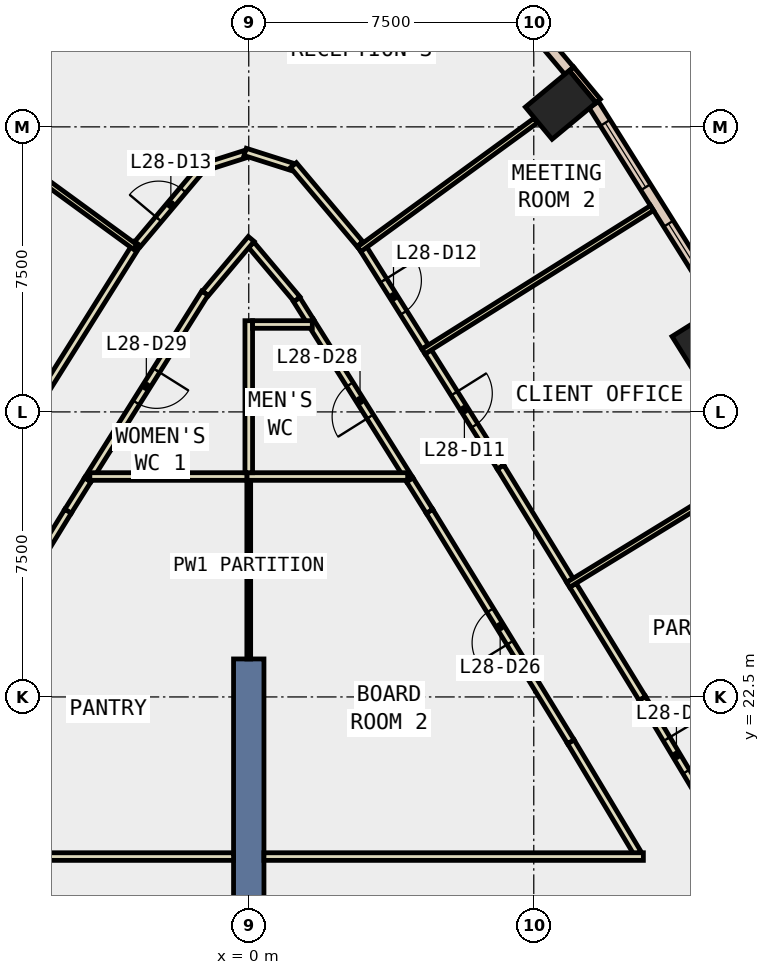
"""IFC4 building model, lengths in metres.
Left out: names, types, materials, properties, quantities, classifications, styles, units other than length and angle.
Written with IfcOpenShell. Run it as: python <this file> out.ifc"""

import sys

from ifc_helpers import new_model, si_unit, direction, frame, frame_2d, origin, origin_2d, place, context, subcontext, project, spatial, rectangle, extrude, element, fill, save


model = new_model("IFC4")
c1 = context("Model", 3, precision=1e-05, world=origin(), true_north=direction((0.0, 1.0)))
c2 = subcontext(c1, "Body", "Model", "MODEL_VIEW")
j1 = project(units=[si_unit("LENGTHUNIT", "METRE"), si_unit("PLANEANGLEUNIT", "RADIAN")], contexts=[c1])
p1 = place(None, origin())
s1 = spatial("IfcSite", under=j1, at=p1, CompositionType="ELEMENT")
p2 = place(p1, origin())
s2 = spatial("IfcBuilding", under=s1, at=p2, CompositionType="ELEMENT")
p3 = place(p2, frame((0.0, 0.0, 128.6)))
s3 = spatial("IfcBuildingStorey", under=s2, at=p3, CompositionType="ELEMENT", Elevation=128.6)
for number, where, z_axis, x_axis in (
    (1, (12.066, 31.917, -0.4), (0.0, 0.0, 1.0), (-0.53, 0.848, 0.0)),
    (2, (8.208, 38.077, -0.4), (0.0, 0.0, 1.0), (-0.638, 0.77, 0.0)),
):
    element("IfcColumn", number, at=place(p3, frame(where, z_axis=z_axis, x_axis=x_axis)), inside=s3, PredefinedType="COLUMN", context=c2, shape_type="SweptSolid", body=[
        extrude(rectangle(XDim=1.1, YDim=1.5, at=origin_2d()), origin(), (0.0, 0.0, 1.0), 4.0),
    ])
p4 = place(p3, frame((0.0, 14.5, -0.4), z_axis=(0.0, 0.0, 1.0), x_axis=(0.0, 1.0, 0.0)))
e3 = element("IfcWall", 3, at=p4, inside=s3, PredefinedType="SHEAR", context=c2, shape_type="SweptSolid", body=[
    extrude(rectangle(XDim=9.0, YDim=0.8, at=frame_2d((4.5, 0.0))), origin(), (0.0, 0.0, 1.0), 4.0),
])
p5 = place(p3, frame((9.194, 38.181, 0.0), z_axis=(0.0, 0.0, 1.0), x_axis=(-0.638566874111, 0.769566337159, 0.0)))
e4 = element("IfcWall", 4, at=p5, inside=s3, PredefinedType="STANDARD", context=c2, shape_type="SweptSolid", body=[
    extrude(rectangle(XDim=1.1, YDim=0.15, at=frame_2d((0.55, 0.0))), origin(), (0.0, 0.0, 1.0), 3.6),
])
p6 = place(p3, frame((12.41, 32.779, 0.0), z_axis=(0.0, 0.0, 1.0), x_axis=(-0.53160564075, 0.846991996847, 0.0)))
e5 = element("IfcWall", 5, at=p6, inside=s3, PredefinedType="STANDARD", context=c2, shape_type="SweptSolid", body=[
    extrude(rectangle(XDim=6.266, YDim=0.3, at=frame_2d((3.133, 0.0))), origin(), (0.0, 0.0, 1.0), 3.6),
])
p7 = place(p6, frame((0.566, 0.0, 0.9)))
e6 = element("IfcOpeningElement", 6, at=p7, cuts=e5, PredefinedType="OPENING", context=c2, shape_type="SweptSolid", body=[
    extrude(rectangle(XDim=2.0, YDim=2.6, at=frame_2d((1.0, 1.3))), frame((0.0, 0.16, 0.0), z_axis=(0.0, -1.0, 0.0), x_axis=(1.0, 0.0, 0.0)), (0.0, 0.0, 1.0), 0.32),
])
p8 = place(p6, frame((3.699, 0.0, 0.9)))
e7 = element("IfcOpeningElement", 7, at=p8, cuts=e5, PredefinedType="OPENING", context=c2, shape_type="SweptSolid", body=[
    extrude(rectangle(XDim=2.0, YDim=2.6, at=frame_2d((1.0, 1.3))), frame((0.0, 0.16, 0.0), z_axis=(0.0, -1.0, 0.0), x_axis=(1.0, 0.0, 0.0)), (0.0, 0.0, 1.0), 0.32),
])
p9 = place(p3, frame((8.432, 38.976, 0.0), z_axis=(0.0, 0.0, 1.0), x_axis=(-0.643948600943, 0.765068754652, 0.0)))
e8 = element("IfcWall", 8, at=p9, inside=s3, PredefinedType="STANDARD", context=c2, shape_type="SweptSolid", body=[
    extrude(rectangle(XDim=4.138, YDim=0.3, at=frame_2d((2.069, 0.0))), origin(), (0.0, 0.0, 1.0), 3.6),
])
p10 = place(p9, frame((1.369, 0.0, 0.9)))
e9 = element("IfcOpeningElement", 9, at=p10, cuts=e8, PredefinedType="OPENING", context=c2, shape_type="SweptSolid", body=[
    extrude(rectangle(XDim=1.4, YDim=2.6, at=frame_2d((0.7, 1.3))), frame((0.0, 0.16, 0.0), z_axis=(0.0, -1.0, 0.0), x_axis=(1.0, 0.0, 0.0)), (0.0, 0.0, 1.0), 0.32),
])
p11 = place(p3, frame((10.232, 18.386, 0.0), z_axis=(0.0, 0.0, 1.0), x_axis=(-0.513592824646, 0.858034038062, 0.0)))
e10 = element("IfcWall", 10, at=p11, inside=s3, PredefinedType="PARTITIONING", context=c2, shape_type="SweptSolid", body=[
    extrude(rectangle(XDim=3.421, YDim=0.2, at=frame_2d((1.71, 0.0))), origin(), (0.0, 0.0, 1.0), 3.6),
])
p12 = place(p3, frame((8.475, 21.321, 0.0), z_axis=(0.0, 0.0, 1.0), x_axis=(-0.522743103274, 0.852490262689, 0.0)))
e11 = element("IfcWall", 11, at=p12, inside=s3, PredefinedType="PARTITIONING", context=c2, shape_type="SweptSolid", body=[
    extrude(rectangle(XDim=7.115, YDim=0.2, at=frame_2d((3.557, 0.0))), origin(), (0.0, 0.0, 1.0), 3.6),
])
p13 = place(p12, frame((3.057, 0.0, 0.0)))
e12 = element("IfcOpeningElement", 12, at=p13, cuts=e11, PredefinedType="OPENING", context=c2, shape_type="SweptSolid", body=[
    extrude(rectangle(XDim=1.0, YDim=2.1, at=frame_2d((0.5, 1.05))), frame((0.0, 0.11, 0.0), z_axis=(0.0, -1.0, 0.0), x_axis=(1.0, 0.0, 0.0)), (0.0, 0.0, 1.0), 0.22),
])
for number, where, z_axis, x_axis in (
    (13, (4.756, 27.386, 0.0), (0.0, 0.0, 1.0), (-0.531, 0.847, 0.0)),
    (14, (-4.236, 28.215, 0.0), (0.0, 0.0, 1.0), (-0.531, -0.847, 0.0)),
):
    element("IfcWall", number, at=place(p3, frame(where, z_axis=z_axis, x_axis=x_axis)), inside=s3, PredefinedType="PARTITIONING", context=c2, shape_type="SweptSolid", body=[
        extrude(rectangle(XDim=0.979, YDim=0.2, at=frame_2d((0.489, 0.0))), origin(), (0.0, 0.0, 1.0), 3.6),
    ])
p14 = place(p3, frame((-4.756, 27.386, 0.0), z_axis=(0.0, 0.0, 1.0), x_axis=(-0.522743103274, -0.852490262689, 0.0)))
e15 = element("IfcWall", 15, at=p14, inside=s3, PredefinedType="PARTITIONING", context=c2, shape_type="SweptSolid", body=[
    extrude(rectangle(XDim=7.115, YDim=0.2, at=frame_2d((3.557, 0.0))), origin(), (0.0, 0.0, 1.0), 3.6),
])
p15 = place(p14, frame((3.057, 0.0, 0.0)))
e16 = element("IfcOpeningElement", 16, at=p15, cuts=e15, PredefinedType="OPENING", context=c2, shape_type="SweptSolid", body=[
    extrude(rectangle(XDim=1.0, YDim=2.1, at=frame_2d((0.5, 1.05))), frame((0.0, 0.11, 0.0), z_axis=(0.0, -1.0, 0.0), x_axis=(1.0, 0.0, 0.0)), (0.0, 0.0, 1.0), 0.22),
])
p16 = place(p3, frame((4.236, 28.215, 0.0), z_axis=(0.0, 0.0, 1.0), x_axis=(-0.531602694807, 0.84699384583, 0.0)))
e17 = element("IfcWall", 17, at=p16, inside=s3, PredefinedType="PARTITIONING", context=c2, shape_type="SweptSolid", body=[
    extrude(rectangle(XDim=4.923, YDim=0.2, at=frame_2d((2.461, 0.0))), origin(), (0.0, 0.0, 1.0), 3.6),
])
p17 = place(p16, frame((1.961, 0.0, 0.0)))
e18 = element("IfcOpeningElement", 18, at=p17, cuts=e17, PredefinedType="OPENING", context=c2, shape_type="SweptSolid", body=[
    extrude(rectangle(XDim=1.0, YDim=2.1, at=frame_2d((0.5, 1.05))), frame((0.0, 0.11, 0.0), z_axis=(0.0, -1.0, 0.0), x_axis=(1.0, 0.0, 0.0)), (0.0, 0.0, 1.0), 0.22),
])
p18 = place(p3, frame((1.619, 32.385, 0.0), z_axis=(0.0, 0.0, 1.0), x_axis=(-0.532112237469, 0.84667382547, 0.0)))
e19 = element("IfcWall", 19, at=p18, inside=s3, PredefinedType="PARTITIONING", context=c2, shape_type="SweptSolid", body=[
    extrude(rectangle(XDim=0.675, YDim=0.2, at=frame_2d((0.337, 0.0))), origin(), (0.0, 0.0, 1.0), 3.6),
])
p19 = place(p3, frame((1.271, 32.964, 0.0), z_axis=(0.0, 0.0, 1.0), x_axis=(-0.644007376392, 0.765019280249, 0.0)))
e20 = element("IfcWall", 20, at=p19, inside=s3, PredefinedType="PARTITIONING", context=c2, shape_type="SweptSolid", body=[
    extrude(rectangle(XDim=1.874, YDim=0.2, at=frame_2d((0.937, 0.0))), origin(), (0.0, 0.0, 1.0), 3.6),
])
p20 = place(p3, frame((0.064, 34.551, 0.0), z_axis=(0.0, 0.0, 1.0), x_axis=(-0.643638095982, -0.765329995101, 0.0)))
e21 = element("IfcWall", 21, at=p20, inside=s3, PredefinedType="PARTITIONING", context=c2, shape_type="SweptSolid", body=[
    extrude(rectangle(XDim=1.874, YDim=0.2, at=frame_2d((0.937, 0.0))), origin(), (0.0, 0.0, 1.0), 3.6),
])
p21 = place(p3, frame((-1.154, 33.125, 0.0), z_axis=(0.0, 0.0, 1.0), x_axis=(-0.531652223099, -0.846962758139, 0.0)))
e22 = element("IfcWall", 22, at=p21, inside=s3, PredefinedType="PARTITIONING", context=c2, shape_type="SweptSolid", body=[
    extrude(rectangle(XDim=5.797, YDim=0.2, at=frame_2d((2.898, 0.0))), origin(), (0.0, 0.0, 1.0), 3.6),
])
p22 = place(p21, frame((2.399, 0.0, 0.0)))
e23 = element("IfcOpeningElement", 23, at=p22, cuts=e22, PredefinedType="OPENING", context=c2, shape_type="SweptSolid", body=[
    extrude(rectangle(XDim=1.0, YDim=2.1, at=frame_2d((0.5, 1.05))), frame((0.0, 0.11, 0.0), z_axis=(0.0, -1.0, 0.0), x_axis=(1.0, 0.0, 0.0)), (0.0, 0.0, 1.0), 0.22),
])
p23 = place(p3, frame((8.531, 25.439, 0.0), z_axis=(0.0, 0.0, 1.0), x_axis=(0.522704631836, -0.852513852003, 0.0)))
e24 = element("IfcWall", 24, at=p23, inside=s3, PredefinedType="PARTITIONING", context=c2, shape_type="SweptSolid", body=[
    extrude(rectangle(XDim=3.493, YDim=0.2, at=frame_2d((1.747, 0.0))), origin(), (0.0, 0.0, 1.0), 3.6),
])
p24 = place(p3, frame((10.357, 22.461, 0.0), z_axis=(0.0, 0.0, 1.0), x_axis=(0.513467759888, -0.858108885606, 0.0)))
e25 = element("IfcWall", 25, at=p24, inside=s3, PredefinedType="PARTITIONING", context=c2, shape_type="SweptSolid", body=[
    extrude(rectangle(XDim=3.494, YDim=0.2, at=frame_2d((1.747, 0.0))), origin(), (0.0, 0.0, 1.0), 3.6),
])
p25 = place(p24, frame((1.247, 0.0, 0.0)))
e26 = element("IfcOpeningElement", 26, at=p25, cuts=e25, PredefinedType="OPENING", context=c2, shape_type="SweptSolid", body=[
    extrude(rectangle(XDim=1.0, YDim=2.1, at=frame_2d((0.5, 1.05))), frame((0.0, 0.11, 0.0), z_axis=(0.0, -1.0, 0.0), x_axis=(1.0, 0.0, 0.0)), (0.0, 0.0, 1.0), 0.22),
])
p26 = place(p3, frame((4.722, 31.579, 0.0), z_axis=(0.0, 0.0, 1.0), x_axis=(0.531664655861, -0.846954953766, 0.0)))
e27 = element("IfcWall", 27, at=p26, inside=s3, PredefinedType="PARTITIONING", context=c2, shape_type="SweptSolid", body=[
    extrude(rectangle(XDim=3.581, YDim=0.2, at=frame_2d((1.791, 0.0))), origin(), (0.0, 0.0, 1.0), 3.6),
])
p27 = place(p26, frame((1.291, 0.0, 0.0)))
e28 = element("IfcOpeningElement", 28, at=p27, cuts=e27, PredefinedType="OPENING", context=c2, shape_type="SweptSolid", body=[
    extrude(rectangle(XDim=1.0, YDim=2.1, at=frame_2d((0.5, 1.05))), frame((0.0, 0.11, 0.0), z_axis=(0.0, -1.0, 0.0), x_axis=(1.0, 0.0, 0.0)), (0.0, 0.0, 1.0), 0.22),
])
p28 = place(p3, frame((6.626, 28.546, 0.0), z_axis=(0.0, 0.0, 1.0), x_axis=(0.522580081027, -0.852590205734, 0.0)))
e29 = element("IfcWall", 29, at=p28, inside=s3, PredefinedType="PARTITIONING", context=c2, shape_type="SweptSolid", body=[
    extrude(rectangle(XDim=3.494, YDim=0.2, at=frame_2d((1.747, 0.0))), origin(), (0.0, 0.0, 1.0), 3.6),
])
p29 = place(p3, frame((2.975, 34.361, 0.0), z_axis=(0.0, 0.0, 1.0), x_axis=(0.531740854333, -0.846907116414, 0.0)))
e30 = element("IfcWall", 30, at=p29, inside=s3, PredefinedType="PARTITIONING", context=c2, shape_type="SweptSolid", body=[
    extrude(rectangle(XDim=3.135, YDim=0.2, at=frame_2d((1.567, 0.0))), origin(), (0.0, 0.0, 1.0), 3.6),
])
p30 = place(p29, frame((1.068, 0.0, 0.0)))
e31 = element("IfcOpeningElement", 31, at=p30, cuts=e30, PredefinedType="OPENING", context=c2, shape_type="SweptSolid", body=[
    extrude(rectangle(XDim=1.0, YDim=2.1, at=frame_2d((0.5, 1.05))), frame((0.0, 0.11, 0.0), z_axis=(0.0, -1.0, 0.0), x_axis=(1.0, 0.0, 0.0)), (0.0, 0.0, 1.0), 0.22),
])
p31 = place(p3, frame((-2.924, 34.417, 0.0), z_axis=(0.0, 0.0, 1.0), x_axis=(0.644113583568, 0.764929860486, 0.0)))
e32 = element("IfcWall", 32, at=p31, inside=s3, PredefinedType="PARTITIONING", context=c2, shape_type="SweptSolid", body=[
    extrude(rectangle(XDim=2.714, YDim=0.2, at=frame_2d((1.357, 0.0))), origin(), (0.0, 0.0, 1.0), 3.6),
])
p32 = place(p31, frame((0.857, 0.0, 0.0)))
e33 = element("IfcOpeningElement", 33, at=p32, cuts=e32, PredefinedType="OPENING", context=c2, shape_type="SweptSolid", body=[
    extrude(rectangle(XDim=1.0, YDim=2.1, at=frame_2d((0.5, 1.05))), frame((0.0, 0.11, 0.0), z_axis=(0.0, -1.0, 0.0), x_axis=(1.0, 0.0, 0.0)), (0.0, 0.0, 1.0), 0.22),
])
p33 = place(p3, frame((-1.145, 36.447, 0.0), z_axis=(0.0, 0.0, 1.0), x_axis=(0.952957783381, 0.303103056886, 0.0)))
e34 = element("IfcWall", 34, at=p33, inside=s3, PredefinedType="PARTITIONING", context=c2, shape_type="SweptSolid", body=[
    extrude(rectangle(XDim=1.102, YDim=0.2, at=frame_2d((0.551, 0.0))), origin(), (0.0, 0.0, 1.0), 3.6),
])
p34 = place(p3, frame((-0.095, 36.841, 0.0), z_axis=(0.0, 0.0, 1.0), x_axis=(0.953036611979, -0.302855107646, 0.0)))
e35 = element("IfcWall", 35, at=p34, inside=s3, PredefinedType="PARTITIONING", context=c2, shape_type="SweptSolid", body=[
    extrude(rectangle(XDim=1.301, YDim=0.2, at=frame_2d((0.65, 0.0))), origin(), (0.0, 0.0, 1.0), 3.6),
])
p35 = place(p3, frame((1.176, 36.493, 0.0), z_axis=(0.0, 0.0, 1.0), x_axis=(0.644113583568, -0.764929860486, 0.0)))
e36 = element("IfcWall", 36, at=p35, inside=s3, PredefinedType="PARTITIONING", context=c2, shape_type="SweptSolid", body=[
    extrude(rectangle(XDim=2.714, YDim=0.2, at=frame_2d((1.357, 0.0))), origin(), (0.0, 0.0, 1.0), 3.6),
])
p36 = place(p3, frame((-6.626, 28.546, 0.0), z_axis=(0.0, 0.0, 1.0), x_axis=(0.531701842465, 0.846931609234, 0.0)))
e37 = element("IfcWall", 37, at=p36, inside=s3, PredefinedType="PARTITIONING", context=c2, shape_type="SweptSolid", body=[
    extrude(rectangle(XDim=6.942, YDim=0.2, at=frame_2d((3.471, 0.0))), origin(), (0.0, 0.0, 1.0), 3.6),
])
for number, where, z_axis, x_axis in (
    (38, (0.4, 18.3, 0.0), (0.0, 0.0, 1.0), (1.0, 0.0, 0.0)),
    (39, (-10.384, 18.3, 0.0), (0.0, 0.0, 1.0), (1.0, 0.0, 0.0)),
):
    element("IfcWall", number, at=place(p3, frame(where, z_axis=z_axis, x_axis=x_axis)), inside=s3, PredefinedType="PARTITIONING", context=c2, shape_type="SweptSolid", body=[
        extrude(rectangle(XDim=9.984, YDim=0.2, at=frame_2d((4.992, 0.0))), origin(), (0.0, 0.0, 1.0), 3.6),
    ])
p37 = place(p3, frame((0.0, 23.5, 0.0), z_axis=(0.0, 0.0, 1.0), x_axis=(0.0, 1.0, 0.0)))
e40 = element("IfcWall", 40, at=p37, inside=s3, PredefinedType="PARTITIONING", context=c2, shape_type="SweptSolid", body=[
    extrude(rectangle(XDim=4.9, YDim=0.1, at=frame_2d((2.45, 0.0))), origin(), (0.0, 0.0, 1.0), 3.6),
])
p38 = place(p3, frame((-0.05, 28.3, 0.0), z_axis=(0.0, 0.0, 1.0), x_axis=(1.0, 0.0, 0.0)))
e41 = element("IfcWall", 41, at=p38, inside=s3, PredefinedType="PARTITIONING", context=c2, shape_type="SweptSolid", body=[
    extrude(rectangle(XDim=4.232, YDim=0.2, at=frame_2d((2.116, 0.0))), origin(), (0.0, 0.0, 1.0), 3.6),
])
p39 = place(p3, frame((-4.182, 28.3, 0.0), z_axis=(0.0, 0.0, 1.0), x_axis=(1.0, 0.0, 0.0)))
e42 = element("IfcWall", 42, at=p39, inside=s3, PredefinedType="PARTITIONING", context=c2, shape_type="SweptSolid", body=[
    extrude(rectangle(XDim=4.132, YDim=0.2, at=frame_2d((2.066, 0.0))), origin(), (0.0, 0.0, 1.0), 3.6),
])
p40 = place(p3, frame((0.0, 28.4, 0.0), z_axis=(0.0, 0.0, 1.0), x_axis=(0.0, 1.0, 0.0)))
e43 = element("IfcWall", 43, at=p40, inside=s3, PredefinedType="PARTITIONING", context=c2, shape_type="SweptSolid", body=[
    extrude(rectangle(XDim=4.0, YDim=0.2, at=frame_2d((2.0, 0.0))), origin(), (0.0, 0.0, 1.0), 3.6),
])
p41 = place(p3, frame((0.1, 32.3, 0.0), z_axis=(0.0, 0.0, 1.0), x_axis=(1.0, 0.0, 0.0)))
e44 = element("IfcWall", 44, at=p41, inside=s3, PredefinedType="PARTITIONING", context=c2, shape_type="SweptSolid", body=[
    extrude(rectangle(XDim=1.572, YDim=0.2, at=frame_2d((0.786, 0.0))), origin(), (0.0, 0.0, 1.0), 3.6),
])
p42 = place(p3, frame((8.406, 25.451, 0.0), z_axis=(0.0, 0.0, 1.0), x_axis=(0.852520194289, 0.522694287637, 0.0)))
e45 = element("IfcWall", 45, at=p42, inside=s3, PredefinedType="PARTITIONING", context=c2, shape_type="SweptSolid", body=[
    extrude(rectangle(XDim=7.1, YDim=0.15, at=frame_2d((3.55, 0.0))), origin(), (0.0, 0.0, 1.0), 3.6),
])
p43 = place(p3, frame((4.597, 31.589, 0.0), z_axis=(0.0, 0.0, 1.0), x_axis=(0.846980720953, 0.531623605885, 0.0)))
e46 = element("IfcWall", 46, at=p43, inside=s3, PredefinedType="PARTITIONING", context=c2, shape_type="SweptSolid", body=[
    extrude(rectangle(XDim=7.101, YDim=0.15, at=frame_2d((3.55, 0.0))), origin(), (0.0, 0.0, 1.0), 3.6),
])
p44 = place(p3, frame((2.908, 34.281, 0.0), z_axis=(0.0, 0.0, 1.0), x_axis=(0.807935867, 0.589270425879, 0.0)))
e47 = element("IfcWall", 47, at=p44, inside=s3, PredefinedType="PARTITIONING", context=c2, shape_type="SweptSolid", body=[
    extrude(rectangle(XDim=5.744, YDim=0.15, at=frame_2d((2.872, 0.0))), origin(), (0.0, 0.0, 1.0), 3.6),
])
p45 = place(p3, frame((-2.989, 34.34, 0.0), z_axis=(0.0, 0.0, 1.0), x_axis=(-0.807932877043, 0.589274525322, 0.0)))
e48 = element("IfcWall", 48, at=p45, inside=s3, PredefinedType="PARTITIONING", context=c2, shape_type="SweptSolid", body=[
    extrude(rectangle(XDim=5.644, YDim=0.15, at=frame_2d((2.822, 0.0))), origin(), (0.0, 0.0, 1.0), 3.6),
])
p46 = place(p7, origin())
e49 = element("IfcWindow", 49, at=p46, inside=s3, PartitioningType="SINGLE_PANEL", PredefinedType="WINDOW", context=c2, shape_type="SweptSolid", body=[
    extrude(rectangle(XDim=2.0, YDim=2.6, at=frame_2d((1.0, 1.3))), frame((0.0, 0.03, 0.0), z_axis=(0.0, -1.0, 0.0), x_axis=(1.0, 0.0, 0.0)), (0.0, 0.0, 1.0), 0.06),
])
fill(e6, e49)
p47 = place(p8, origin())
e50 = element("IfcWindow", 50, at=p47, inside=s3, PartitioningType="SINGLE_PANEL", PredefinedType="WINDOW", context=c2, shape_type="SweptSolid", body=[
    extrude(rectangle(XDim=2.0, YDim=2.6, at=frame_2d((1.0, 1.3))), frame((0.0, 0.03, 0.0), z_axis=(0.0, -1.0, 0.0), x_axis=(1.0, 0.0, 0.0)), (0.0, 0.0, 1.0), 0.06),
])
fill(e7, e50)
p48 = place(p25, origin())
e51 = element("IfcDoor", 51, at=p48, inside=s3, OperationType="SINGLE_SWING_RIGHT", PredefinedType="DOOR", context=c2, shape_type="SweptSolid", body=[
    extrude(rectangle(XDim=1.0, YDim=2.1, at=frame_2d((0.5, 1.05))), frame((0.0, 0.025, 0.0), z_axis=(0.0, -1.0, 0.0), x_axis=(1.0, 0.0, 0.0)), (0.0, 0.0, 1.0), 0.05),
])
fill(e26, e51)
p49 = place(p27, origin())
e52 = element("IfcDoor", 52, at=p49, inside=s3, OperationType="SINGLE_SWING_LEFT", PredefinedType="DOOR", context=c2, shape_type="SweptSolid", body=[
    extrude(rectangle(XDim=1.0, YDim=2.1, at=frame_2d((0.5, 1.05))), frame((0.0, 0.025, 0.0), z_axis=(0.0, -1.0, 0.0), x_axis=(1.0, 0.0, 0.0)), (0.0, 0.0, 1.0), 0.05),
])
fill(e28, e52)
p50 = place(p30, origin())
e53 = element("IfcDoor", 53, at=p50, inside=s3, OperationType="SINGLE_SWING_LEFT", PredefinedType="DOOR", context=c2, shape_type="SweptSolid", body=[
    extrude(rectangle(XDim=1.0, YDim=2.1, at=frame_2d((0.5, 1.05))), frame((0.0, 0.025, 0.0), z_axis=(0.0, -1.0, 0.0), x_axis=(1.0, 0.0, 0.0)), (0.0, 0.0, 1.0), 0.05),
])
fill(e31, e53)
p51 = place(p32, origin())
e54 = element("IfcDoor", 54, at=p51, inside=s3, OperationType="SINGLE_SWING_LEFT", PredefinedType="DOOR", context=c2, shape_type="SweptSolid", body=[
    extrude(rectangle(XDim=1.0, YDim=2.1, at=frame_2d((0.5, 1.05))), frame((0.0, 0.025, 0.0), z_axis=(0.0, -1.0, 0.0), x_axis=(1.0, 0.0, 0.0)), (0.0, 0.0, 1.0), 0.05),
])
fill(e33, e54)
p52 = place(p13, origin())
e55 = element("IfcDoor", 55, at=p52, inside=s3, OperationType="SINGLE_SWING_RIGHT", PredefinedType="DOOR", context=c2, shape_type="SweptSolid", body=[
    extrude(rectangle(XDim=1.0, YDim=2.1, at=frame_2d((0.5, 1.05))), frame((0.0, 0.025, 0.0), z_axis=(0.0, -1.0, 0.0), x_axis=(1.0, 0.0, 0.0)), (0.0, 0.0, 1.0), 0.05),
])
fill(e12, e55)
p53 = place(p17, origin())
e56 = element("IfcDoor", 56, at=p53, inside=s3, OperationType="SINGLE_SWING_LEFT", PredefinedType="DOOR", context=c2, shape_type="SweptSolid", body=[
    extrude(rectangle(XDim=1.0, YDim=2.1, at=frame_2d((0.5, 1.05))), frame((0.0, 0.025, 0.0), z_axis=(0.0, -1.0, 0.0), x_axis=(1.0, 0.0, 0.0)), (0.0, 0.0, 1.0), 0.05),
])
fill(e18, e56)
p54 = place(p22, origin())
e57 = element("IfcDoor", 57, at=p54, inside=s3, OperationType="SINGLE_SWING_LEFT", PredefinedType="DOOR", context=c2, shape_type="SweptSolid", body=[
    extrude(rectangle(XDim=1.0, YDim=2.1, at=frame_2d((0.5, 1.05))), frame((0.0, 0.025, 0.0), z_axis=(0.0, -1.0, 0.0), x_axis=(1.0, 0.0, 0.0)), (0.0, 0.0, 1.0), 0.05),
])
fill(e23, e57)
save(model, sys.argv[1])
